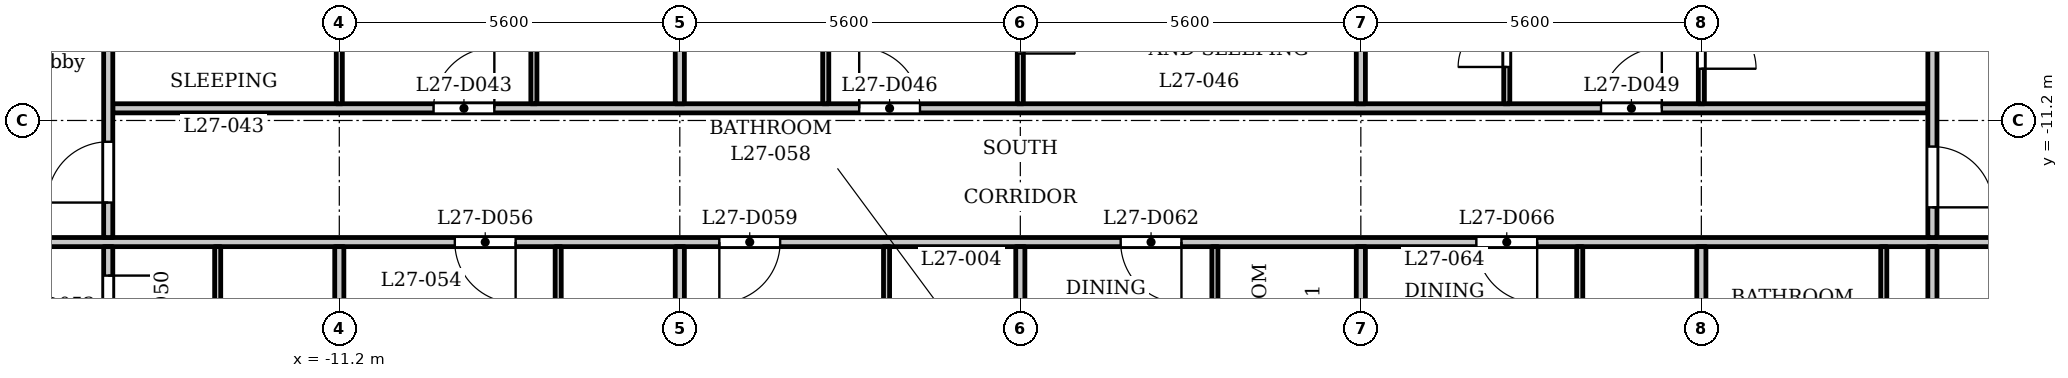
"""IFC4 building model, lengths in metres.
Left out: names, types, materials, properties, quantities, classifications, styles, units other than length and angle.
Written with IfcOpenShell. Run it as: python <this file> out.ifc"""

import sys

from ifc_helpers import new_model, si_unit, direction, frame, frame_2d, origin, place, context, subcontext, project, spatial, rectangle, extrude, element, fill, save


model = new_model("IFC4")
c1 = context("Model", 3, precision=1e-05, world=origin(), true_north=direction((0.0, 1.0)))
c2 = subcontext(c1, "Body", "Model", "MODEL_VIEW")
j1 = project(units=[si_unit("LENGTHUNIT", "METRE"), si_unit("PLANEANGLEUNIT", "RADIAN")], contexts=[c1])
p1 = place(None, origin())
s1 = spatial("IfcSite", under=j1, at=p1, CompositionType="ELEMENT")
p2 = place(p1, origin())
s2 = spatial("IfcBuilding", under=s1, at=p2, CompositionType="ELEMENT")
p3 = place(p2, frame((0.0, 0.0, 107.8)))
s3 = spatial("IfcBuildingStorey", under=s2, at=p3, CompositionType="ELEMENT", Elevation=107.8)
p4 = place(p3, frame((-17.4, -13.2, 0.0), z_axis=(0.0, 0.0, 1.0), x_axis=(1.0, 0.0, 0.0)))
e1 = element("IfcWall", 1, at=p4, inside=s3, PredefinedType="PARTITIONING", context=c2, shape_type="SweptSolid", body=[
    extrude(rectangle(XDim=34.8, YDim=0.15, at=frame_2d((17.4, 0.0))), origin(), (0.0, 0.0, 1.0), 3.2),
])
p5 = place(p4, frame((0.15, 0.0, 0.0)))
e2 = element("IfcOpeningElement", 2, at=p5, cuts=e1, PredefinedType="OPENING", context=c2, shape_type="SweptSolid", body=[
    extrude(rectangle(XDim=1.0, YDim=2.1, at=frame_2d((0.5, 1.05))), frame((0.0, 0.085, 0.0), z_axis=(0.0, -1.0, 0.0), x_axis=(1.0, 0.0, 0.0)), (0.0, 0.0, 1.0), 0.17),
])
p6 = place(p4, frame((33.55, 0.0, 0.0)))
e3 = element("IfcOpeningElement", 3, at=p6, cuts=e1, PredefinedType="OPENING", context=c2, shape_type="SweptSolid", body=[
    extrude(rectangle(XDim=1.0, YDim=2.1, at=frame_2d((0.5, 1.05))), frame((0.0, 0.085, 0.0), z_axis=(0.0, -1.0, 0.0), x_axis=(1.0, 0.0, 0.0)), (0.0, 0.0, 1.0), 0.17),
])
p7 = place(p4, frame((8.1, 0.0, 0.0)))
e4 = element("IfcOpeningElement", 4, at=p7, cuts=e1, PredefinedType="OPENING", context=c2, shape_type="SweptSolid", body=[
    extrude(rectangle(XDim=1.0, YDim=2.1, at=frame_2d((0.5, 1.05))), frame((0.0, 0.085, 0.0), z_axis=(0.0, -1.0, 0.0), x_axis=(1.0, 0.0, 0.0)), (0.0, 0.0, 1.0), 0.17),
])
p8 = place(p4, frame((12.45, 0.0, 0.0)))
e5 = element("IfcOpeningElement", 5, at=p8, cuts=e1, PredefinedType="OPENING", context=c2, shape_type="SweptSolid", body=[
    extrude(rectangle(XDim=1.0, YDim=2.1, at=frame_2d((0.5, 1.05))), frame((0.0, 0.085, 0.0), z_axis=(0.0, -1.0, 0.0), x_axis=(1.0, 0.0, 0.0)), (0.0, 0.0, 1.0), 0.17),
])
p9 = place(p4, frame((19.05, 0.0, 0.0)))
e6 = element("IfcOpeningElement", 6, at=p9, cuts=e1, PredefinedType="OPENING", context=c2, shape_type="SweptSolid", body=[
    extrude(rectangle(XDim=1.0, YDim=2.1, at=frame_2d((0.5, 1.05))), frame((0.0, 0.085, 0.0), z_axis=(0.0, -1.0, 0.0), x_axis=(1.0, 0.0, 0.0)), (0.0, 0.0, 1.0), 0.17),
])
p10 = place(p4, frame((24.9, 0.0, 0.0)))
e7 = element("IfcOpeningElement", 7, at=p10, cuts=e1, PredefinedType="OPENING", context=c2, shape_type="SweptSolid", body=[
    extrude(rectangle(XDim=1.0, YDim=2.1, at=frame_2d((0.5, 1.05))), frame((0.0, 0.085, 0.0), z_axis=(0.0, -1.0, 0.0), x_axis=(1.0, 0.0, 0.0)), (0.0, 0.0, 1.0), 0.17),
])
p11 = place(p3, frame((-14.925, -11.0, 0.0), z_axis=(0.0, 0.0, 1.0), x_axis=(1.0, 0.0, 0.0)))
e8 = element("IfcWall", 8, at=p11, inside=s3, PredefinedType="PARTITIONING", context=c2, shape_type="SweptSolid", body=[
    extrude(rectangle(XDim=29.85, YDim=0.15, at=frame_2d((14.925, 0.0))), origin(), (0.0, 0.0, 1.0), 3.2),
])
p12 = place(p11, frame((5.275, 0.0, 0.0)))
e9 = element("IfcOpeningElement", 9, at=p12, cuts=e8, PredefinedType="OPENING", context=c2, shape_type="SweptSolid", body=[
    extrude(rectangle(XDim=1.0, YDim=2.1, at=frame_2d((0.5, 1.05))), frame((0.0, 0.085, 0.0), z_axis=(0.0, -1.0, 0.0), x_axis=(1.0, 0.0, 0.0)), (0.0, 0.0, 1.0), 0.17),
])
p13 = place(p11, frame((12.275, 0.0, 0.0)))
e10 = element("IfcOpeningElement", 10, at=p13, cuts=e8, PredefinedType="OPENING", context=c2, shape_type="SweptSolid", body=[
    extrude(rectangle(XDim=1.0, YDim=2.1, at=frame_2d((0.5, 1.05))), frame((0.0, 0.085, 0.0), z_axis=(0.0, -1.0, 0.0), x_axis=(1.0, 0.0, 0.0)), (0.0, 0.0, 1.0), 0.17),
])
p14 = place(p11, frame((24.475, 0.0, 0.0)))
e11 = element("IfcOpeningElement", 11, at=p14, cuts=e8, PredefinedType="OPENING", context=c2, shape_type="SweptSolid", body=[
    extrude(rectangle(XDim=1.0, YDim=2.1, at=frame_2d((0.5, 1.05))), frame((0.0, 0.085, 0.0), z_axis=(0.0, -1.0, 0.0), x_axis=(1.0, 0.0, 0.0)), (0.0, 0.0, 1.0), 0.17),
])
p15 = place(p3, frame((-15.0, -15.325, 0.0), z_axis=(0.0, 0.0, 1.0), x_axis=(0.0, 1.0, 0.0)))
e12 = element("IfcWall", 12, at=p15, inside=s3, PredefinedType="PARTITIONING", context=c2, shape_type="SweptSolid", body=[
    extrude(rectangle(XDim=2.05, YDim=0.15, at=frame_2d((1.025, 0.0))), origin(), (0.0, 0.0, 1.0), 3.2),
])
p16 = place(p15, frame((0.574, 0.0, 0.0)))
e13 = element("IfcOpeningElement", 13, at=p16, cuts=e12, PredefinedType="OPENING", context=c2, shape_type="SweptSolid", body=[
    extrude(rectangle(XDim=1.0, YDim=2.1, at=frame_2d((0.5, 1.05))), frame((0.0, 0.085, 0.0), z_axis=(0.0, -1.0, 0.0), x_axis=(1.0, 0.0, 0.0)), (0.0, 0.0, 1.0), 0.17),
])
p17 = place(p3, frame((-15.0, -13.125, 0.0), z_axis=(0.0, 0.0, 1.0), x_axis=(0.0, 1.0, 0.0)))
e14 = element("IfcWall", 14, at=p17, inside=s3, PredefinedType="PARTITIONING", context=c2, shape_type="SweptSolid", body=[
    extrude(rectangle(XDim=6.356, YDim=0.15, at=frame_2d((3.178, 0.0))), origin(), (0.0, 0.0, 1.0), 3.2),
])
p18 = place(p17, frame((0.575, 0.0, 0.0)))
e15 = element("IfcOpeningElement", 15, at=p18, cuts=e14, PredefinedType="OPENING", context=c2, shape_type="SweptSolid", body=[
    extrude(rectangle(XDim=1.0, YDim=2.1, at=frame_2d((0.5, 1.05))), frame((0.0, 0.085, 0.0), z_axis=(0.0, -1.0, 0.0), x_axis=(1.0, 0.0, 0.0)), (0.0, 0.0, 1.0), 0.17),
])
p19 = place(p3, frame((-13.2, -16.45, 0.0), z_axis=(0.0, 0.0, 1.0), x_axis=(0.0, 1.0, 0.0)))
e16 = element("IfcWall", 16, at=p19, inside=s3, PredefinedType="PARTITIONING", context=c2, shape_type="SweptSolid", body=[
    extrude(rectangle(XDim=3.175, YDim=0.1, at=frame_2d((1.587, 0.0))), origin(), (0.0, 0.0, 1.0), 3.2),
])
p20 = place(p3, frame((-11.2, -10.925, 0.0), z_axis=(0.0, 0.0, 1.0), x_axis=(0.0, 1.0, 0.0)))
e17 = element("IfcWall", 17, at=p20, inside=s3, PredefinedType="PARTITIONING", context=c2, shape_type="SweptSolid", body=[
    extrude(rectangle(XDim=3.605, YDim=0.1, at=frame_2d((1.802, 0.0))), origin(), (0.0, 0.0, 1.0), 3.2),
])
p21 = place(p20, frame((1.005, 0.0, 0.0)))
e18 = element("IfcOpeningElement", 18, at=p21, cuts=e17, PredefinedType="OPENING", context=c2, shape_type="SweptSolid", body=[
    extrude(rectangle(XDim=0.9, YDim=2.1, at=frame_2d((0.45, 1.05))), frame((0.0, 0.06, 0.0), z_axis=(0.0, -1.0, 0.0), x_axis=(1.0, 0.0, 0.0)), (0.0, 0.0, 1.0), 0.12),
])
p22 = place(p3, frame((-11.2, -16.45, 0.0), z_axis=(0.0, 0.0, 1.0), x_axis=(0.0, 1.0, 0.0)))
e19 = element("IfcWall", 19, at=p22, inside=s3, PredefinedType="PARTITIONING", context=c2, shape_type="SweptSolid", body=[
    extrude(rectangle(XDim=3.175, YDim=0.15, at=frame_2d((1.587, 0.0))), origin(), (0.0, 0.0, 1.0), 3.2),
])
p23 = place(p3, frame((-8.0, -10.925, 0.0), z_axis=(0.0, 0.0, 1.0), x_axis=(0.0, 1.0, 0.0)))
e20 = element("IfcWall", 20, at=p23, inside=s3, PredefinedType="PARTITIONING", context=c2, shape_type="SweptSolid", body=[
    extrude(rectangle(XDim=3.605, YDim=0.1, at=frame_2d((1.802, 0.0))), origin(), (0.0, 0.0, 1.0), 3.2),
])
p24 = place(p23, frame((2.326, 0.0, 0.0)))
e21 = element("IfcOpeningElement", 21, at=p24, cuts=e20, PredefinedType="OPENING", context=c2, shape_type="SweptSolid", body=[
    extrude(rectangle(XDim=0.8, YDim=2.1, at=frame_2d((0.4, 1.05))), frame((0.0, 0.06, 0.0), z_axis=(0.0, -1.0, 0.0), x_axis=(1.0, 0.0, 0.0)), (0.0, 0.0, 1.0), 0.12),
])
p25 = place(p3, frame((-7.6, -16.45, 0.0), z_axis=(0.0, 0.0, 1.0), x_axis=(0.0, 1.0, 0.0)))
e22 = element("IfcWall", 22, at=p25, inside=s3, PredefinedType="PARTITIONING", context=c2, shape_type="SweptSolid", body=[
    extrude(rectangle(XDim=3.175, YDim=0.1, at=frame_2d((1.587, 0.0))), origin(), (0.0, 0.0, 1.0), 3.2),
])
p26 = place(p3, frame((-5.6, -16.45, 0.0), z_axis=(0.0, 0.0, 1.0), x_axis=(0.0, 1.0, 0.0)))
e23 = element("IfcWall", 23, at=p26, inside=s3, PredefinedType="PARTITIONING", context=c2, shape_type="SweptSolid", body=[
    extrude(rectangle(XDim=3.175, YDim=0.15, at=frame_2d((1.587, 0.0))), origin(), (0.0, 0.0, 1.0), 3.2),
])
p27 = place(p3, frame((-5.6, -10.925, 0.0), z_axis=(0.0, 0.0, 1.0), x_axis=(0.0, 1.0, 0.0)))
e24 = element("IfcWall", 24, at=p27, inside=s3, PredefinedType="PARTITIONING", context=c2, shape_type="SweptSolid", body=[
    extrude(rectangle(XDim=3.605, YDim=0.15, at=frame_2d((1.802, 0.0))), origin(), (0.0, 0.0, 1.0), 3.2),
])
p28 = place(p3, frame((-3.2, -10.925, 0.0), z_axis=(0.0, 0.0, 1.0), x_axis=(0.0, 1.0, 0.0)))
e25 = element("IfcWall", 25, at=p28, inside=s3, PredefinedType="PARTITIONING", context=c2, shape_type="SweptSolid", body=[
    extrude(rectangle(XDim=3.605, YDim=0.1, at=frame_2d((1.802, 0.0))), origin(), (0.0, 0.0, 1.0), 3.2),
])
p29 = place(p28, frame((2.355, 0.0, 0.0)))
e26 = element("IfcOpeningElement", 26, at=p29, cuts=e25, PredefinedType="OPENING", context=c2, shape_type="SweptSolid", body=[
    extrude(rectangle(XDim=0.8, YDim=2.1, at=frame_2d((0.4, 1.05))), frame((0.0, 0.06, 0.0), z_axis=(0.0, -1.0, 0.0), x_axis=(1.0, 0.0, 0.0)), (0.0, 0.0, 1.0), 0.12),
])
p30 = place(p3, frame((-2.2, -16.45, 0.0), z_axis=(0.0, 0.0, 1.0), x_axis=(0.0, 1.0, 0.0)))
e27 = element("IfcWall", 27, at=p30, inside=s3, PredefinedType="PARTITIONING", context=c2, shape_type="SweptSolid", body=[
    extrude(rectangle(XDim=3.175, YDim=0.1, at=frame_2d((1.587, 0.0))), origin(), (0.0, 0.0, 1.0), 3.2),
])
p31 = place(p3, frame((0.0, -10.925, 0.0), z_axis=(0.0, 0.0, 1.0), x_axis=(0.0, 1.0, 0.0)))
e28 = element("IfcWall", 28, at=p31, inside=s3, PredefinedType="PARTITIONING", context=c2, shape_type="SweptSolid", body=[
    extrude(rectangle(XDim=3.605, YDim=0.1, at=frame_2d((1.802, 0.0))), origin(), (0.0, 0.0, 1.0), 3.2),
])
p32 = place(p31, frame((0.826, 0.0, 0.0)))
e29 = element("IfcOpeningElement", 29, at=p32, cuts=e28, PredefinedType="OPENING", context=c2, shape_type="SweptSolid", body=[
    extrude(rectangle(XDim=0.9, YDim=2.1, at=frame_2d((0.45, 1.05))), frame((0.0, 0.06, 0.0), z_axis=(0.0, -1.0, 0.0), x_axis=(1.0, 0.0, 0.0)), (0.0, 0.0, 1.0), 0.12),
])
p33 = place(p3, frame((0.0, -16.45, 0.0), z_axis=(0.0, 0.0, 1.0), x_axis=(0.0, 1.0, 0.0)))
e30 = element("IfcWall", 30, at=p33, inside=s3, PredefinedType="PARTITIONING", context=c2, shape_type="SweptSolid", body=[
    extrude(rectangle(XDim=3.175, YDim=0.15, at=frame_2d((1.587, 0.0))), origin(), (0.0, 0.0, 1.0), 3.2),
])
p34 = place(p3, frame((3.2, -16.45, 0.0), z_axis=(0.0, 0.0, 1.0), x_axis=(0.0, 1.0, 0.0)))
e31 = element("IfcWall", 31, at=p34, inside=s3, PredefinedType="PARTITIONING", context=c2, shape_type="SweptSolid", body=[
    extrude(rectangle(XDim=3.175, YDim=0.1, at=frame_2d((1.587, 0.0))), origin(), (0.0, 0.0, 1.0), 3.2),
])
p35 = place(p3, frame((5.6, -16.45, 0.0), z_axis=(0.0, 0.0, 1.0), x_axis=(0.0, 1.0, 0.0)))
e32 = element("IfcWall", 32, at=p35, inside=s3, PredefinedType="PARTITIONING", context=c2, shape_type="SweptSolid", body=[
    extrude(rectangle(XDim=3.175, YDim=0.15, at=frame_2d((1.587, 0.0))), origin(), (0.0, 0.0, 1.0), 3.2),
])
p36 = place(p3, frame((5.6, -10.925, 0.0), z_axis=(0.0, 0.0, 1.0), x_axis=(0.0, 1.0, 0.0)))
e33 = element("IfcWall", 33, at=p36, inside=s3, PredefinedType="PARTITIONING", context=c2, shape_type="SweptSolid", body=[
    extrude(rectangle(XDim=3.605, YDim=0.15, at=frame_2d((1.802, 0.0))), origin(), (0.0, 0.0, 1.0), 3.2),
])
p37 = place(p3, frame((8.0, -10.925, 0.0), z_axis=(0.0, 0.0, 1.0), x_axis=(0.0, 1.0, 0.0)))
e34 = element("IfcWall", 34, at=p37, inside=s3, PredefinedType="PARTITIONING", context=c2, shape_type="SweptSolid", body=[
    extrude(rectangle(XDim=3.605, YDim=0.1, at=frame_2d((1.802, 0.0))), origin(), (0.0, 0.0, 1.0), 3.2),
])
p38 = place(p37, frame((0.605, 0.0, 0.0)))
e35 = element("IfcOpeningElement", 35, at=p38, cuts=e34, PredefinedType="OPENING", context=c2, shape_type="SweptSolid", body=[
    extrude(rectangle(XDim=0.8, YDim=2.1, at=frame_2d((0.4, 1.05))), frame((0.0, 0.06, 0.0), z_axis=(0.0, -1.0, 0.0), x_axis=(1.0, 0.0, 0.0)), (0.0, 0.0, 1.0), 0.12),
])
p39 = place(p3, frame((9.2, -16.45, 0.0), z_axis=(0.0, 0.0, 1.0), x_axis=(0.0, 1.0, 0.0)))
e36 = element("IfcWall", 36, at=p39, inside=s3, PredefinedType="PARTITIONING", context=c2, shape_type="SweptSolid", body=[
    extrude(rectangle(XDim=3.175, YDim=0.1, at=frame_2d((1.587, 0.0))), origin(), (0.0, 0.0, 1.0), 3.2),
])
p40 = place(p3, frame((11.2, -10.925, 0.0), z_axis=(0.0, 0.0, 1.0), x_axis=(0.0, 1.0, 0.0)))
e37 = element("IfcWall", 37, at=p40, inside=s3, PredefinedType="PARTITIONING", context=c2, shape_type="SweptSolid", body=[
    extrude(rectangle(XDim=3.605, YDim=0.1, at=frame_2d((1.802, 0.0))), origin(), (0.0, 0.0, 1.0), 3.2),
])
p41 = place(p40, frame((0.576, 0.0, 0.0)))
e38 = element("IfcOpeningElement", 38, at=p41, cuts=e37, PredefinedType="OPENING", context=c2, shape_type="SweptSolid", body=[
    extrude(rectangle(XDim=0.9, YDim=2.1, at=frame_2d((0.45, 1.05))), frame((0.0, 0.06, 0.0), z_axis=(0.0, -1.0, 0.0), x_axis=(1.0, 0.0, 0.0)), (0.0, 0.0, 1.0), 0.12),
])
p42 = place(p3, frame((11.2, -16.45, 0.0), z_axis=(0.0, 0.0, 1.0), x_axis=(0.0, 1.0, 0.0)))
e39 = element("IfcWall", 39, at=p42, inside=s3, PredefinedType="PARTITIONING", context=c2, shape_type="SweptSolid", body=[
    extrude(rectangle(XDim=3.175, YDim=0.15, at=frame_2d((1.587, 0.0))), origin(), (0.0, 0.0, 1.0), 3.2),
])
p43 = place(p3, frame((14.2, -16.45, 0.0), z_axis=(0.0, 0.0, 1.0), x_axis=(0.0, 1.0, 0.0)))
e40 = element("IfcWall", 40, at=p43, inside=s3, PredefinedType="PARTITIONING", context=c2, shape_type="SweptSolid", body=[
    extrude(rectangle(XDim=3.175, YDim=0.1, at=frame_2d((1.587, 0.0))), origin(), (0.0, 0.0, 1.0), 3.2),
])
p44 = place(p3, frame((15.0, -15.325, 0.0), z_axis=(0.0, 0.0, 1.0), x_axis=(0.0, 1.0, 0.0)))
e41 = element("IfcWall", 41, at=p44, inside=s3, PredefinedType="PARTITIONING", context=c2, shape_type="SweptSolid", body=[
    extrude(rectangle(XDim=2.05, YDim=0.15, at=frame_2d((1.025, 0.0))), origin(), (0.0, 0.0, 1.0), 3.2),
])
p45 = place(p3, frame((15.0, -13.125, 0.0), z_axis=(0.0, 0.0, 1.0), x_axis=(0.0, 1.0, 0.0)))
e42 = element("IfcWall", 42, at=p45, inside=s3, PredefinedType="PARTITIONING", context=c2, shape_type="SweptSolid", body=[
    extrude(rectangle(XDim=6.356, YDim=0.15, at=frame_2d((3.178, 0.0))), origin(), (0.0, 0.0, 1.0), 3.2),
])
p46 = place(p45, frame((0.496, 0.0, 0.0)))
e43 = element("IfcOpeningElement", 43, at=p46, cuts=e42, PredefinedType="OPENING", context=c2, shape_type="SweptSolid", body=[
    extrude(rectangle(XDim=1.0, YDim=2.1, at=frame_2d((0.5, 1.05))), frame((0.0, 0.085, 0.0), z_axis=(0.0, -1.0, 0.0), x_axis=(1.0, 0.0, 0.0)), (0.0, 0.0, 1.0), 0.17),
])
p47 = place(p18, origin())
e44 = element("IfcDoor", 44, at=p47, inside=s3, OperationType="SINGLE_SWING_RIGHT", PredefinedType="DOOR", context=c2, shape_type="SweptSolid", body=[
    extrude(rectangle(XDim=1.0, YDim=2.1, at=frame_2d((0.5, 1.05))), frame((0.0, 0.025, 0.0), z_axis=(0.0, -1.0, 0.0), x_axis=(1.0, 0.0, 0.0)), (0.0, 0.0, 1.0), 0.05),
])
fill(e15, e44)
p48 = place(p46, origin())
e45 = element("IfcDoor", 45, at=p48, inside=s3, OperationType="SINGLE_SWING_LEFT", PredefinedType="DOOR", context=c2, shape_type="SweptSolid", body=[
    extrude(rectangle(XDim=1.0, YDim=2.1, at=frame_2d((0.5, 1.05))), frame((0.0, 0.025, 0.0), z_axis=(0.0, -1.0, 0.0), x_axis=(1.0, 0.0, 0.0)), (0.0, 0.0, 1.0), 0.05),
])
fill(e43, e45)
p49 = place(p12, origin())
e46 = element("IfcDoor", 46, at=p49, inside=s3, OperationType="SINGLE_SWING_LEFT", PredefinedType="DOOR", context=c2, shape_type="SweptSolid", body=[
    extrude(rectangle(XDim=1.0, YDim=2.1, at=frame_2d((0.5, 1.05))), frame((0.0, 0.025, 0.0), z_axis=(0.0, -1.0, 0.0), x_axis=(1.0, 0.0, 0.0)), (0.0, 0.0, 1.0), 0.05),
])
fill(e9, e46)
p50 = place(p13, origin())
e47 = element("IfcDoor", 47, at=p50, inside=s3, OperationType="SINGLE_SWING_RIGHT", PredefinedType="DOOR", context=c2, shape_type="SweptSolid", body=[
    extrude(rectangle(XDim=1.0, YDim=2.1, at=frame_2d((0.5, 1.05))), frame((0.0, 0.025, 0.0), z_axis=(0.0, -1.0, 0.0), x_axis=(1.0, 0.0, 0.0)), (0.0, 0.0, 1.0), 0.05),
])
fill(e10, e47)
p51 = place(p32, origin())
e48 = element("IfcDoor", 48, at=p51, inside=s3, OperationType="SINGLE_SWING_LEFT", PredefinedType="DOOR", context=c2, shape_type="SweptSolid", body=[
    extrude(rectangle(XDim=0.9, YDim=2.1, at=frame_2d((0.45, 1.05))), frame((0.0, 0.025, 0.0), z_axis=(0.0, -1.0, 0.0), x_axis=(1.0, 0.0, 0.0)), (0.0, 0.0, 1.0), 0.05),
])
fill(e29, e48)
p52 = place(p14, origin())
e49 = element("IfcDoor", 49, at=p52, inside=s3, OperationType="SINGLE_SWING_LEFT", PredefinedType="DOOR", context=c2, shape_type="SweptSolid", body=[
    extrude(rectangle(XDim=1.0, YDim=2.1, at=frame_2d((0.5, 1.05))), frame((0.0, 0.025, 0.0), z_axis=(0.0, -1.0, 0.0), x_axis=(1.0, 0.0, 0.0)), (0.0, 0.0, 1.0), 0.05),
])
fill(e11, e49)
p53 = place(p38, origin())
e50 = element("IfcDoor", 50, at=p53, inside=s3, OperationType="SINGLE_SWING_RIGHT", PredefinedType="DOOR", context=c2, shape_type="SweptSolid", body=[
    extrude(rectangle(XDim=0.8, YDim=2.1, at=frame_2d((0.4, 1.05))), frame((0.0, 0.025, 0.0), z_axis=(0.0, -1.0, 0.0), x_axis=(1.0, 0.0, 0.0)), (0.0, 0.0, 1.0), 0.05),
])
fill(e35, e50)
p54 = place(p41, origin())
e51 = element("IfcDoor", 51, at=p54, inside=s3, OperationType="SINGLE_SWING_LEFT", PredefinedType="DOOR", context=c2, shape_type="SweptSolid", body=[
    extrude(rectangle(XDim=0.9, YDim=2.1, at=frame_2d((0.45, 1.05))), frame((0.0, 0.025, 0.0), z_axis=(0.0, -1.0, 0.0), x_axis=(1.0, 0.0, 0.0)), (0.0, 0.0, 1.0), 0.05),
])
fill(e38, e51)
p55 = place(p16, origin())
e52 = element("IfcDoor", 52, at=p55, inside=s3, OperationType="SINGLE_SWING_RIGHT", PredefinedType="DOOR", context=c2, shape_type="SweptSolid", body=[
    extrude(rectangle(XDim=1.0, YDim=2.1, at=frame_2d((0.5, 1.05))), frame((0.0, 0.025, 0.0), z_axis=(0.0, -1.0, 0.0), x_axis=(1.0, 0.0, 0.0)), (0.0, 0.0, 1.0), 0.05),
])
fill(e13, e52)
p56 = place(p7, origin())
e53 = element("IfcDoor", 53, at=p56, inside=s3, OperationType="SINGLE_SWING_RIGHT", PredefinedType="DOOR", context=c2, shape_type="SweptSolid", body=[
    extrude(rectangle(XDim=1.0, YDim=2.1, at=frame_2d((0.5, 1.05))), frame((0.0, 0.025, 0.0), z_axis=(0.0, -1.0, 0.0), x_axis=(1.0, 0.0, 0.0)), (0.0, 0.0, 1.0), 0.05),
])
fill(e4, e53)
p57 = place(p8, origin())
e54 = element("IfcDoor", 54, at=p57, inside=s3, OperationType="SINGLE_SWING_LEFT", PredefinedType="DOOR", context=c2, shape_type="SweptSolid", body=[
    extrude(rectangle(XDim=1.0, YDim=2.1, at=frame_2d((0.5, 1.05))), frame((0.0, 0.025, 0.0), z_axis=(0.0, -1.0, 0.0), x_axis=(1.0, 0.0, 0.0)), (0.0, 0.0, 1.0), 0.05),
])
fill(e5, e54)
p58 = place(p9, origin())
e55 = element("IfcDoor", 55, at=p58, inside=s3, OperationType="SINGLE_SWING_RIGHT", PredefinedType="DOOR", context=c2, shape_type="SweptSolid", body=[
    extrude(rectangle(XDim=1.0, YDim=2.1, at=frame_2d((0.5, 1.05))), frame((0.0, 0.025, 0.0), z_axis=(0.0, -1.0, 0.0), x_axis=(1.0, 0.0, 0.0)), (0.0, 0.0, 1.0), 0.05),
])
fill(e6, e55)
p59 = place(p10, origin())
e56 = element("IfcDoor", 56, at=p59, inside=s3, OperationType="SINGLE_SWING_RIGHT", PredefinedType="DOOR", context=c2, shape_type="SweptSolid", body=[
    extrude(rectangle(XDim=1.0, YDim=2.1, at=frame_2d((0.5, 1.05))), frame((0.0, 0.025, 0.0), z_axis=(0.0, -1.0, 0.0), x_axis=(1.0, 0.0, 0.0)), (0.0, 0.0, 1.0), 0.05),
])
fill(e7, e56)
save(model, sys.argv[1])
